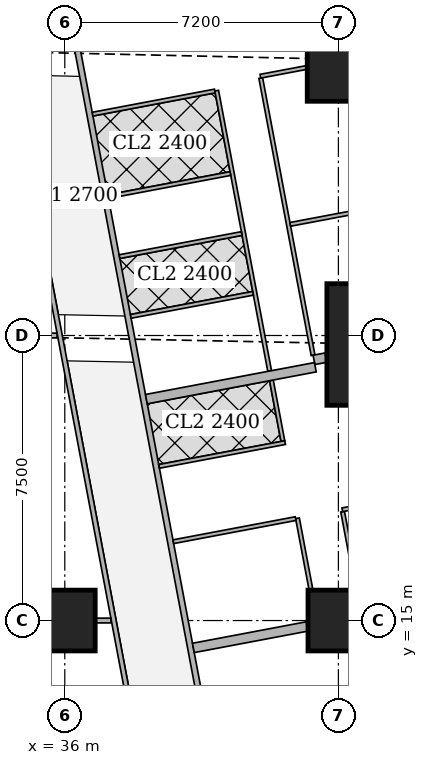
"""IFC4 building model, lengths in metres.
Left out: names, types, materials, properties, quantities, classifications, styles, units other than length and angle.
Written with IfcOpenShell. Run it as: python <this file> out.ifc"""

import sys

from ifc_helpers import new_model, si_unit, direction, frame, frame_2d, origin, origin_2d, place, context, subcontext, project, spatial, rectangle, extrude, element, fill, save


model = new_model("IFC4")
c1 = context("Model", 3, precision=1e-05, world=origin(), true_north=direction((0.0, 1.0)))
c2 = subcontext(c1, "Body", "Model", "MODEL_VIEW")
j1 = project(units=[si_unit("LENGTHUNIT", "METRE"), si_unit("PLANEANGLEUNIT", "RADIAN")], contexts=[c1])
p1 = place(None, origin())
s1 = spatial("IfcSite", under=j1, at=p1, CompositionType="ELEMENT")
p2 = place(p1, origin())
s2 = spatial("IfcBuilding", under=s1, at=p2, CompositionType="ELEMENT")
p3 = place(p2, frame((0.0, 0.0, 100.4)))
s3 = spatial("IfcBuildingStorey", under=s2, at=p3, CompositionType="ELEMENT", Elevation=100.4)
for number, where, z_axis, x_axis in (
    (1, (36.0, 15.0, 0.0), (0.0, 0.0, 1.0), (1.0, 0.0, 0.0)),
    (2, (43.2, 15.0, 0.0), (0.0, 0.0, 1.0), (1.0, 0.0, 0.0)),
):
    element("IfcColumn", number, at=place(p3, frame(where, z_axis=z_axis, x_axis=x_axis)), inside=s3, PredefinedType="COLUMN", context=c2, shape_type="SweptSolid", body=[
        extrude(rectangle(XDim=1.6, YDim=1.6, at=origin_2d()), origin(), (0.0, 0.0, 1.0), 3.75),
    ])
p4 = place(p3, frame((44.697, 22.263, 0.0), z_axis=(0.0, 0.0, 1.0), x_axis=(1.0, 0.0, 0.0)))
e3 = element("IfcColumn", 3, at=p4, inside=s3, PredefinedType="COLUMN", context=c2, shape_type="SweptSolid", body=[
    extrude(rectangle(XDim=3.6, YDim=3.2, at=origin_2d()), origin(), (0.0, 0.0, 1.0), 3.75),
])
p5 = place(p3, frame((43.48, 29.763, 0.0), z_axis=(0.0, 0.0, 1.0), x_axis=(1.0, 0.0, 0.0)))
e4 = element("IfcColumn", 4, at=p5, inside=s3, PredefinedType="COLUMN", context=c2, shape_type="SweptSolid", body=[
    extrude(rectangle(XDim=2.2, YDim=2.2, at=origin_2d()), origin(), (0.0, 0.0, 1.0), 3.75),
])
p6 = place(p3, frame((50.653, 2.703, 0.0), z_axis=(0.0, 0.0, 1.0), x_axis=(-0.185612026696, 0.982623109613, 0.0)))
e5 = element("IfcWall", 5, at=p6, inside=s3, PredefinedType="SOLIDWALL", context=c2, shape_type="SweptSolid", body=[
    extrude(rectangle(XDim=41.393, YDim=0.2, at=frame_2d((20.697, 0.0))), origin(), (0.0, 0.0, 1.0), 3.5),
])
p7 = place(p6, frame((1.633, 0.0, 0.9)))
e6 = element("IfcOpeningElement", 6, at=p7, cuts=e5, PredefinedType="OPENING", context=c2, shape_type="SweptSolid", body=[
    extrude(rectangle(XDim=1.8, YDim=1.5, at=frame_2d((0.9, 0.75))), frame((0.0, 0.11, 0.0), z_axis=(0.0, -1.0, 0.0), x_axis=(1.0, 0.0, 0.0)), (0.0, 0.0, 1.0), 0.22),
])
p8 = place(p6, frame((6.032, 0.0, 0.9)))
e7 = element("IfcOpeningElement", 7, at=p8, cuts=e5, PredefinedType="OPENING", context=c2, shape_type="SweptSolid", body=[
    extrude(rectangle(XDim=1.8, YDim=1.5, at=frame_2d((0.9, 0.75))), frame((0.0, 0.11, 0.0), z_axis=(0.0, -1.0, 0.0), x_axis=(1.0, 0.0, 0.0)), (0.0, 0.0, 1.0), 0.22),
])
p9 = place(p6, frame((9.848, 0.0, 0.9)))
e8 = element("IfcOpeningElement", 8, at=p9, cuts=e5, PredefinedType="OPENING", context=c2, shape_type="SweptSolid", body=[
    extrude(rectangle(XDim=1.8, YDim=1.5, at=frame_2d((0.9, 0.75))), frame((0.0, 0.11, 0.0), z_axis=(0.0, -1.0, 0.0), x_axis=(1.0, 0.0, 0.0)), (0.0, 0.0, 1.0), 0.22),
])
p10 = place(p6, frame((13.664, 0.0, 0.9)))
e9 = element("IfcOpeningElement", 9, at=p10, cuts=e5, PredefinedType="OPENING", context=c2, shape_type="SweptSolid", body=[
    extrude(rectangle(XDim=1.8, YDim=1.5, at=frame_2d((0.9, 0.75))), frame((0.0, 0.11, 0.0), z_axis=(0.0, -1.0, 0.0), x_axis=(1.0, 0.0, 0.0)), (0.0, 0.0, 1.0), 0.22),
])
p11 = place(p6, frame((17.481, 0.0, 0.9)))
e10 = element("IfcOpeningElement", 10, at=p11, cuts=e5, PredefinedType="OPENING", context=c2, shape_type="SweptSolid", body=[
    extrude(rectangle(XDim=1.8, YDim=1.5, at=frame_2d((0.9, 0.75))), frame((0.0, 0.11, 0.0), z_axis=(0.0, -1.0, 0.0), x_axis=(1.0, 0.0, 0.0)), (0.0, 0.0, 1.0), 0.22),
])
p12 = place(p6, frame((21.297, 0.0, 0.9)))
e11 = element("IfcOpeningElement", 11, at=p12, cuts=e5, PredefinedType="OPENING", context=c2, shape_type="SweptSolid", body=[
    extrude(rectangle(XDim=1.8, YDim=1.5, at=frame_2d((0.9, 0.75))), frame((0.0, 0.11, 0.0), z_axis=(0.0, -1.0, 0.0), x_axis=(1.0, 0.0, 0.0)), (0.0, 0.0, 1.0), 0.22),
])
p13 = place(p6, frame((25.113, 0.0, 0.9)))
e12 = element("IfcOpeningElement", 12, at=p13, cuts=e5, PredefinedType="OPENING", context=c2, shape_type="SweptSolid", body=[
    extrude(rectangle(XDim=1.8, YDim=1.5, at=frame_2d((0.9, 0.75))), frame((0.0, 0.11, 0.0), z_axis=(0.0, -1.0, 0.0), x_axis=(1.0, 0.0, 0.0)), (0.0, 0.0, 1.0), 0.22),
])
p14 = place(p6, frame((28.93, 0.0, 0.9)))
e13 = element("IfcOpeningElement", 13, at=p14, cuts=e5, PredefinedType="OPENING", context=c2, shape_type="SweptSolid", body=[
    extrude(rectangle(XDim=1.8, YDim=1.5, at=frame_2d((0.9, 0.75))), frame((0.0, 0.11, 0.0), z_axis=(0.0, -1.0, 0.0), x_axis=(1.0, 0.0, 0.0)), (0.0, 0.0, 1.0), 0.22),
])
p15 = place(p6, frame((32.746, 0.0, 0.9)))
e14 = element("IfcOpeningElement", 14, at=p15, cuts=e5, PredefinedType="OPENING", context=c2, shape_type="SweptSolid", body=[
    extrude(rectangle(XDim=1.8, YDim=1.5, at=frame_2d((0.9, 0.75))), frame((0.0, 0.11, 0.0), z_axis=(0.0, -1.0, 0.0), x_axis=(1.0, 0.0, 0.0)), (0.0, 0.0, 1.0), 0.22),
])
p16 = place(p6, frame((36.481, 0.0, 0.9)))
e15 = element("IfcOpeningElement", 15, at=p16, cuts=e5, PredefinedType="OPENING", context=c2, shape_type="SweptSolid", body=[
    extrude(rectangle(XDim=1.8, YDim=1.5, at=frame_2d((0.9, 0.75))), frame((0.0, 0.11, 0.0), z_axis=(0.0, -1.0, 0.0), x_axis=(1.0, 0.0, 0.0)), (0.0, 0.0, 1.0), 0.22),
])
p17 = place(p3, frame((33.382, 45.65, 0.0), z_axis=(0.0, 0.0, 1.0), x_axis=(0.185593544777, -0.982626600565, 0.0)))
e16 = element("IfcWall", 16, at=p17, inside=s3, PredefinedType="SOLIDWALL", context=c2, shape_type="SweptSolid", body=[
    extrude(rectangle(XDim=47.118, YDim=0.15, at=frame_2d((23.559, 0.0))), origin(), (0.0, 0.0, 1.0), 2.2),
])
p18 = place(p17, frame((10.662, 0.0, 0.0)))
e17 = element("IfcOpeningElement", 17, at=p18, cuts=e16, PredefinedType="OPENING", context=c2, shape_type="SweptSolid", body=[
    extrude(rectangle(XDim=1.0, YDim=2.1, at=frame_2d((0.5, 1.05))), frame((0.0, 0.085, 0.0), z_axis=(0.0, -1.0, 0.0), x_axis=(1.0, 0.0, 0.0)), (0.0, 0.0, 1.0), 0.17),
])
p19 = place(p17, frame((15.237, 0.0, 0.0)))
e18 = element("IfcOpeningElement", 18, at=p19, cuts=e16, PredefinedType="OPENING", context=c2, shape_type="SweptSolid", body=[
    extrude(rectangle(XDim=1.0, YDim=2.1, at=frame_2d((0.5, 1.05))), frame((0.0, 0.085, 0.0), z_axis=(0.0, -1.0, 0.0), x_axis=(1.0, 0.0, 0.0)), (0.0, 0.0, 1.0), 0.17),
])
p20 = place(p17, frame((27.341, 0.0, 0.0)))
e19 = element("IfcOpeningElement", 19, at=p20, cuts=e16, PredefinedType="OPENING", context=c2, shape_type="SweptSolid", body=[
    extrude(rectangle(XDim=1.0, YDim=2.1, at=frame_2d((0.5, 1.05))), frame((0.0, 0.085, 0.0), z_axis=(0.0, -1.0, 0.0), x_axis=(1.0, 0.0, 0.0)), (0.0, 0.0, 1.0), 0.17),
])
p21 = place(p17, frame((33.833, 0.0, 0.0)))
e20 = element("IfcOpeningElement", 20, at=p21, cuts=e16, PredefinedType="OPENING", context=c2, shape_type="SweptSolid", body=[
    extrude(rectangle(XDim=1.0, YDim=2.1, at=frame_2d((0.5, 1.05))), frame((0.0, 0.085, 0.0), z_axis=(0.0, -1.0, 0.0), x_axis=(1.0, 0.0, 0.0)), (0.0, 0.0, 1.0), 0.17),
])
p22 = place(p3, frame((41.157, 29.273, 0.0), z_axis=(0.0, 0.0, 1.0), x_axis=(0.18542464283, -0.982658486877, 0.0)))
e21 = element("IfcWall", 21, at=p22, inside=s3, PredefinedType="PARTITIONING", context=c2, shape_type="SweptSolid", body=[
    extrude(rectangle(XDim=7.421, YDim=0.1, at=frame_2d((3.71, 0.0))), origin(), (0.0, 0.0, 1.0), 2.5),
])
p23 = place(p22, frame((0.9, 0.0, 0.0)))
e22 = element("IfcOpeningElement", 22, at=p23, cuts=e21, PredefinedType="OPENING", context=c2, shape_type="SweptSolid", body=[
    extrude(rectangle(XDim=0.9, YDim=2.1, at=frame_2d((0.45, 1.05))), frame((0.0, 0.06, 0.0), z_axis=(0.0, -1.0, 0.0), x_axis=(1.0, 0.0, 0.0)), (0.0, 0.0, 1.0), 0.12),
])
p24 = place(p22, frame((4.126, 0.0, 0.0)))
e23 = element("IfcOpeningElement", 23, at=p24, cuts=e21, PredefinedType="OPENING", context=c2, shape_type="SweptSolid", body=[
    extrude(rectangle(XDim=0.9, YDim=2.1, at=frame_2d((0.45, 1.05))), frame((0.0, 0.06, 0.0), z_axis=(0.0, -1.0, 0.0), x_axis=(1.0, 0.0, 0.0)), (0.0, 0.0, 1.0), 0.12),
])
p25 = place(p3, frame((39.997, 28.942, 0.0), z_axis=(0.0, 0.0, 1.0), x_axis=(0.185686318797, -0.982609073341, 0.0)))
e24 = element("IfcWall", 24, at=p25, inside=s3, PredefinedType="PARTITIONING", context=c2, shape_type="SweptSolid", body=[
    extrude(rectangle(XDim=7.508, YDim=0.1, at=frame_2d((3.754, 0.0))), origin(), (0.0, 0.0, 1.0), 2.5),
])
p26 = place(p25, frame((0.655, 0.0, 0.0)))
e25 = element("IfcOpeningElement", 25, at=p26, cuts=e24, PredefinedType="OPENING", context=c2, shape_type="SweptSolid", body=[
    extrude(rectangle(XDim=0.9, YDim=2.1, at=frame_2d((0.45, 1.05))), frame((0.0, 0.06, 0.0), z_axis=(0.0, -1.0, 0.0), x_axis=(1.0, 0.0, 0.0)), (0.0, 0.0, 1.0), 0.12),
])
p27 = place(p25, frame((4.166, 0.0, 0.0)))
e26 = element("IfcOpeningElement", 26, at=p27, cuts=e24, PredefinedType="OPENING", context=c2, shape_type="SweptSolid", body=[
    extrude(rectangle(XDim=0.9, YDim=2.1, at=frame_2d((0.45, 1.05))), frame((0.0, 0.06, 0.0), z_axis=(0.0, -1.0, 0.0), x_axis=(1.0, 0.0, 0.0)), (0.0, 0.0, 1.0), 0.12),
])
p28 = place(p25, frame((2.563, 0.0, 0.0)))
e27 = element("IfcOpeningElement", 27, at=p28, cuts=e24, PredefinedType="OPENING", context=c2, shape_type="SweptSolid", body=[
    extrude(rectangle(XDim=0.9, YDim=2.1, at=frame_2d((0.45, 1.05))), frame((0.0, 0.06, 0.0), z_axis=(0.0, -1.0, 0.0), x_axis=(1.0, 0.0, 0.0)), (0.0, 0.0, 1.0), 0.12),
])
p29 = place(p25, frame((6.074, 0.0, 0.0)))
e28 = element("IfcOpeningElement", 28, at=p29, cuts=e24, PredefinedType="OPENING", context=c2, shape_type="SweptSolid", body=[
    extrude(rectangle(XDim=0.9, YDim=2.1, at=frame_2d((0.45, 1.05))), frame((0.0, 0.06, 0.0), z_axis=(0.0, -1.0, 0.0), x_axis=(1.0, 0.0, 0.0)), (0.0, 0.0, 1.0), 0.12),
])
p30 = place(p3, frame((42.37, 29.553, 0.0), z_axis=(0.0, 0.0, 1.0), x_axis=(-0.98263602344, -0.185543648338, 0.0)))
e29 = element("IfcWall", 29, at=p30, inside=s3, PredefinedType="PARTITIONING", context=c2, shape_type="SweptSolid", body=[
    extrude(rectangle(XDim=1.245, YDim=0.1, at=frame_2d((0.623, 0.0))), origin(), (0.0, 0.0, 1.0), 2.5),
])
p31 = place(p3, frame((46.11, 26.213, 0.0), z_axis=(0.0, 0.0, 1.0), x_axis=(-0.982623519589, -0.185609856287, 0.0)))
e30 = element("IfcWall", 30, at=p31, inside=s3, PredefinedType="PARTITIONING", context=c2, shape_type="SweptSolid", body=[
    extrude(rectangle(XDim=4.25, YDim=0.1, at=frame_2d((2.125, 0.0))), origin(), (0.0, 0.0, 1.0), 2.2),
])
p32 = place(p3, frame((39.948, 28.933, 0.0), z_axis=(0.0, 0.0, 1.0), x_axis=(-0.982542259571, -0.186039533857, 0.0)))
e31 = element("IfcWall", 31, at=p32, inside=s3, PredefinedType="PARTITIONING", context=c2, shape_type="SweptSolid", body=[
    extrude(rectangle(XDim=3.274, YDim=0.1, at=frame_2d((1.637, 0.0))), origin(), (0.0, 0.0, 1.0), 3.5),
])
p33 = place(p3, frame((40.656, 25.183, 0.0), z_axis=(0.0, 0.0, 1.0), x_axis=(-0.982596739811, -0.18575157311, 0.0)))
e32 = element("IfcWall", 32, at=p33, inside=s3, PredefinedType="PARTITIONING", context=c2, shape_type="SweptSolid", body=[
    extrude(rectangle(XDim=3.274, YDim=0.1, at=frame_2d((1.637, 0.0))), origin(), (0.0, 0.0, 1.0), 3.5),
])
p34 = place(p3, frame((40.358, 26.761, 0.0), z_axis=(0.0, 0.0, 1.0), x_axis=(-0.982607776398, -0.185693181787, 0.0)))
e33 = element("IfcWall", 33, at=p34, inside=s3, PredefinedType="PARTITIONING", context=c2, shape_type="SweptSolid", body=[
    extrude(rectangle(XDim=3.274, YDim=0.1, at=frame_2d((1.637, 0.0))), origin(), (0.0, 0.0, 1.0), 3.5),
])
p35 = place(p3, frame((40.954, 23.61, 0.0), z_axis=(0.0, 0.0, 1.0), x_axis=(-0.982661397469, -0.185409217473, 0.0)))
e34 = element("IfcWall", 34, at=p35, inside=s3, PredefinedType="PARTITIONING", context=c2, shape_type="SweptSolid", body=[
    extrude(rectangle(XDim=3.275, YDim=0.1, at=frame_2d((1.637, 0.0))), origin(), (0.0, 0.0, 1.0), 2.5),
])
p36 = place(p3, frame((41.437, 21.319, 0.0), z_axis=(0.0, 0.0, 1.0), x_axis=(0.185793689589, -0.982588777113, 0.0)))
e35 = element("IfcWall", 35, at=p36, inside=s3, PredefinedType="PARTITIONING", context=c2, shape_type="SweptSolid", body=[
    extrude(rectangle(XDim=1.625, YDim=0.1, at=frame_2d((0.813, 0.0))), origin(), (0.0, 0.0, 1.0), 3.5),
])
p37 = place(p36, frame((0.325, 0.0, 0.0)))
e36 = element("IfcOpeningElement", 36, at=p37, cuts=e35, PredefinedType="OPENING", context=c2, shape_type="SweptSolid", body=[
    extrude(rectangle(XDim=0.9, YDim=2.1, at=frame_2d((0.45, 1.05))), frame((0.0, 0.06, 0.0), z_axis=(0.0, -1.0, 0.0), x_axis=(1.0, 0.0, 0.0)), (0.0, 0.0, 1.0), 0.12),
])
p38 = place(p3, frame((41.798, 19.682, 0.0), z_axis=(0.0, 0.0, 1.0), x_axis=(-0.982656183703, -0.185436848091, 0.0)))
e37 = element("IfcWall", 37, at=p38, inside=s3, PredefinedType="PARTITIONING", context=c2, shape_type="SweptSolid", body=[
    extrude(rectangle(XDim=3.376, YDim=0.1, at=frame_2d((1.688, 0.0))), origin(), (0.0, 0.0, 1.0), 3.5),
])
p39 = place(p3, frame((43.311, 17.865, 0.0), z_axis=(0.0, 0.0, 1.0), x_axis=(0.185507827929, -0.982642786457, 0.0)))
e38 = element("IfcWall", 38, at=p39, inside=s3, PredefinedType="PARTITIONING", context=c2, shape_type="SweptSolid", body=[
    extrude(rectangle(XDim=2.091, YDim=0.1, at=frame_2d((1.046, 0.0))), origin(), (0.0, 0.0, 1.0), 3.5),
])
p40 = place(p39, frame((0.15, 0.0, 0.0)))
e39 = element("IfcOpeningElement", 39, at=p40, cuts=e38, PredefinedType="OPENING", context=c2, shape_type="SweptSolid", body=[
    extrude(rectangle(XDim=0.9, YDim=2.1, at=frame_2d((0.45, 1.05))), frame((0.0, 0.06, 0.0), z_axis=(0.0, -1.0, 0.0), x_axis=(1.0, 0.0, 0.0)), (0.0, 0.0, 1.0), 0.12),
])
p41 = place(p3, frame((42.123, 17.691, 0.0), z_axis=(0.0, 0.0, 1.0), x_axis=(0.185458984533, -0.982652006081, 0.0)))
e40 = element("IfcWall", 40, at=p41, inside=s3, PredefinedType="PARTITIONING", context=c2, shape_type="SweptSolid", body=[
    extrude(rectangle(XDim=1.914, YDim=0.1, at=frame_2d((0.957, 0.0))), origin(), (0.0, 0.0, 1.0), 3.5),
])
p42 = place(p3, frame((47.527, 18.712, 0.0), z_axis=(0.0, 0.0, 1.0), x_axis=(-0.982633535512, -0.185556823879, 0.0)))
e41 = element("IfcWall", 41, at=p42, inside=s3, PredefinedType="PARTITIONING", context=c2, shape_type="SweptSolid", body=[
    extrude(rectangle(XDim=4.3, YDim=0.1, at=frame_2d((2.15, 0.0))), origin(), (0.0, 0.0, 1.0), 2.2),
])
p43 = place(p3, frame((42.074, 17.682, 0.0), z_axis=(0.0, 0.0, 1.0), x_axis=(-0.982620626894, -0.185625169636, 0.0)))
e42 = element("IfcWall", 42, at=p43, inside=s3, PredefinedType="PARTITIONING", context=c2, shape_type="SweptSolid", body=[
    extrude(rectangle(XDim=3.275, YDim=0.1, at=frame_2d((1.637, 0.0))), origin(), (0.0, 0.0, 1.0), 3.5),
])
p44 = place(p43, frame((1.201, 0.0, 0.0)))
e43 = element("IfcOpeningElement", 43, at=p44, cuts=e42, PredefinedType="OPENING", context=c2, shape_type="SweptSolid", body=[
    extrude(rectangle(XDim=0.9, YDim=2.1, at=frame_2d((0.45, 1.05))), frame((0.0, 0.06, 0.0), z_axis=(0.0, -1.0, 0.0), x_axis=(1.0, 0.0, 0.0)), (0.0, 0.0, 1.0), 0.12),
])
p45 = place(p3, frame((42.873, 21.918, 0.0), z_axis=(0.0, 0.0, 1.0), x_axis=(-0.982431406936, -0.186624035603, 0.0)))
e44 = element("IfcWall", 44, at=p45, inside=s3, PredefinedType="SOLIDWALL", context=c2, shape_type="SweptSolid", body=[
    extrude(rectangle(XDim=0.322, YDim=0.25, at=frame_2d((0.161, 0.0))), origin(), (0.0, 0.0, 1.0), 2.5),
])
p46 = place(p3, frame((42.593, 21.665, 0.0), z_axis=(0.0, 0.0, 1.0), x_axis=(-0.982612837616, -0.185666398014, 0.0)))
e45 = element("IfcWall", 45, at=p46, inside=s3, PredefinedType="SOLIDWALL", context=c2, shape_type="SweptSolid", body=[
    extrude(rectangle(XDim=4.525, YDim=0.25, at=frame_2d((2.262, 0.0))), origin(), (0.0, 0.0, 1.0), 2.5),
])
p47 = place(p3, frame((42.376, 14.844, 0.0), z_axis=(0.0, 0.0, 1.0), x_axis=(-0.982636286056, -0.185542257522, 0.0)))
e46 = element("IfcWall", 46, at=p47, inside=s3, PredefinedType="SOLIDWALL", context=c2, shape_type="SweptSolid", body=[
    extrude(rectangle(XDim=3.045, YDim=0.25, at=frame_2d((1.522, 0.0))), origin(), (0.0, 0.0, 1.0), 3.5),
])
p48 = place(p3, frame((38.202, 10.163, 0.0), z_axis=(0.0, 0.0, 1.0), x_axis=(-0.185610321132, 0.982623431783, 0.0)))
e47 = element("IfcWall", 47, at=p48, inside=s3, PredefinedType="PARTITIONING", context=c2, shape_type="SweptSolid", body=[
    extrude(rectangle(XDim=25.111, YDim=0.125, at=frame_2d((12.556, 0.0))), origin(), (0.0, 0.0, 1.0), 2.5),
])
p49 = place(p48, frame((0.708, 0.0, 0.0)))
e48 = element("IfcOpeningElement", 48, at=p49, cuts=e47, PredefinedType="OPENING", context=c2, shape_type="SweptSolid", body=[
    extrude(rectangle(XDim=1.0, YDim=2.1, at=frame_2d((0.5, 1.05))), frame((0.0, 0.073, 0.0), z_axis=(0.0, -1.0, 0.0), x_axis=(1.0, 0.0, 0.0)), (0.0, 0.0, 1.0), 0.145),
])
p50 = place(p48, frame((6.0, 0.0, 0.0)))
e49 = element("IfcOpeningElement", 49, at=p50, cuts=e47, PredefinedType="OPENING", context=c2, shape_type="SweptSolid", body=[
    extrude(rectangle(XDim=1.0, YDim=2.1, at=frame_2d((0.5, 1.05))), frame((0.0, 0.073, 0.0), z_axis=(0.0, -1.0, 0.0), x_axis=(1.0, 0.0, 0.0)), (0.0, 0.0, 1.0), 0.145),
])
p51 = place(p48, frame((13.378, 0.0, 0.0)))
e50 = element("IfcOpeningElement", 50, at=p51, cuts=e47, PredefinedType="OPENING", context=c2, shape_type="SweptSolid", body=[
    extrude(rectangle(XDim=1.0, YDim=2.1, at=frame_2d((0.5, 1.05))), frame((0.0, 0.073, 0.0), z_axis=(0.0, -1.0, 0.0), x_axis=(1.0, 0.0, 0.0)), (0.0, 0.0, 1.0), 0.145),
])
p52 = place(p48, frame((21.25, 0.0, 0.0)))
e51 = element("IfcOpeningElement", 51, at=p52, cuts=e47, PredefinedType="OPENING", context=c2, shape_type="SweptSolid", body=[
    extrude(rectangle(XDim=1.0, YDim=2.1, at=frame_2d((0.5, 1.05))), frame((0.0, 0.073, 0.0), z_axis=(0.0, -1.0, 0.0), x_axis=(1.0, 0.0, 0.0)), (0.0, 0.0, 1.0), 0.145),
])
p53 = place(p3, frame((36.801, 15.0, 0.0), z_axis=(0.0, 0.0, 1.0), x_axis=(1.0, 0.0, 0.0)))
e52 = element("IfcWall", 52, at=p53, inside=s3, PredefinedType="PARTITIONING", context=c2, shape_type="SweptSolid", body=[
    extrude(rectangle(XDim=0.412, YDim=0.125, at=frame_2d((0.206, 0.0))), origin(), (0.0, 0.0, 1.0), 3.5),
])
p54 = place(p3, frame((33.801, 22.5, 0.0), z_axis=(0.0, 0.0, 1.0), x_axis=(1.0, 0.0, 0.0)))
e53 = element("IfcWall", 53, at=p54, inside=s3, PredefinedType="PARTITIONING", context=c2, shape_type="SweptSolid", body=[
    extrude(rectangle(XDim=1.995, YDim=0.125, at=frame_2d((0.998, 0.0))), origin(), (0.0, 0.0, 1.0), 2.5),
])
p55 = place(p23, origin())
e54 = element("IfcDoor", 54, at=p55, inside=s3, OperationType="SINGLE_SWING_LEFT", PredefinedType="DOOR", context=c2, shape_type="SweptSolid", body=[
    extrude(rectangle(XDim=0.9, YDim=2.1, at=frame_2d((0.45, 1.05))), frame((0.0, 0.025, 0.0), z_axis=(0.0, -1.0, 0.0), x_axis=(1.0, 0.0, 0.0)), (0.0, 0.0, 1.0), 0.05),
])
fill(e22, e54)
p56 = place(p24, origin())
e55 = element("IfcDoor", 55, at=p56, inside=s3, OperationType="SINGLE_SWING_LEFT", PredefinedType="DOOR", context=c2, shape_type="SweptSolid", body=[
    extrude(rectangle(XDim=0.9, YDim=2.1, at=frame_2d((0.45, 1.05))), frame((0.0, 0.025, 0.0), z_axis=(0.0, -1.0, 0.0), x_axis=(1.0, 0.0, 0.0)), (0.0, 0.0, 1.0), 0.05),
])
fill(e23, e55)
p57 = place(p26, origin())
e56 = element("IfcDoor", 56, at=p57, inside=s3, OperationType="SINGLE_SWING_RIGHT", PredefinedType="DOOR", context=c2, shape_type="SweptSolid", body=[
    extrude(rectangle(XDim=0.9, YDim=2.1, at=frame_2d((0.45, 1.05))), frame((0.0, 0.025, 0.0), z_axis=(0.0, -1.0, 0.0), x_axis=(1.0, 0.0, 0.0)), (0.0, 0.0, 1.0), 0.05),
])
fill(e25, e56)
p58 = place(p27, origin())
e57 = element("IfcDoor", 57, at=p58, inside=s3, OperationType="SINGLE_SWING_RIGHT", PredefinedType="DOOR", context=c2, shape_type="SweptSolid", body=[
    extrude(rectangle(XDim=0.9, YDim=2.1, at=frame_2d((0.45, 1.05))), frame((0.0, 0.025, 0.0), z_axis=(0.0, -1.0, 0.0), x_axis=(1.0, 0.0, 0.0)), (0.0, 0.0, 1.0), 0.05),
])
fill(e26, e57)
p59 = place(p28, origin())
e58 = element("IfcDoor", 58, at=p59, inside=s3, OperationType="SINGLE_SWING_RIGHT", PredefinedType="DOOR", context=c2, shape_type="SweptSolid", body=[
    extrude(rectangle(XDim=0.9, YDim=2.1, at=frame_2d((0.45, 1.05))), frame((0.0, 0.025, 0.0), z_axis=(0.0, -1.0, 0.0), x_axis=(1.0, 0.0, 0.0)), (0.0, 0.0, 1.0), 0.05),
])
fill(e27, e58)
p60 = place(p29, origin())
e59 = element("IfcDoor", 59, at=p60, inside=s3, OperationType="SINGLE_SWING_LEFT", PredefinedType="DOOR", context=c2, shape_type="SweptSolid", body=[
    extrude(rectangle(XDim=0.9, YDim=2.1, at=frame_2d((0.45, 1.05))), frame((0.0, 0.025, 0.0), z_axis=(0.0, -1.0, 0.0), x_axis=(1.0, 0.0, 0.0)), (0.0, 0.0, 1.0), 0.05),
])
fill(e28, e59)
p61 = place(p19, origin())
e60 = element("IfcDoor", 60, at=p61, inside=s3, OperationType="SINGLE_SWING_LEFT", PredefinedType="DOOR", context=c2, shape_type="SweptSolid", body=[
    extrude(rectangle(XDim=1.0, YDim=2.1, at=frame_2d((0.5, 1.05))), frame((0.0, 0.025, 0.0), z_axis=(0.0, -1.0, 0.0), x_axis=(1.0, 0.0, 0.0)), (0.0, 0.0, 1.0), 0.05),
])
fill(e18, e60)
p62 = place(p37, origin())
e61 = element("IfcDoor", 61, at=p62, inside=s3, OperationType="SINGLE_SWING_RIGHT", PredefinedType="DOOR", context=c2, shape_type="SweptSolid", body=[
    extrude(rectangle(XDim=0.9, YDim=2.1, at=frame_2d((0.45, 1.05))), frame((0.0, 0.025, 0.0), z_axis=(0.0, -1.0, 0.0), x_axis=(1.0, 0.0, 0.0)), (0.0, 0.0, 1.0), 0.05),
])
fill(e36, e61)
p63 = place(p40, origin())
e62 = element("IfcDoor", 62, at=p63, inside=s3, OperationType="SINGLE_SWING_LEFT", PredefinedType="DOOR", context=c2, shape_type="SweptSolid", body=[
    extrude(rectangle(XDim=0.9, YDim=2.1, at=frame_2d((0.45, 1.05))), frame((0.0, 0.025, 0.0), z_axis=(0.0, -1.0, 0.0), x_axis=(1.0, 0.0, 0.0)), (0.0, 0.0, 1.0), 0.05),
])
fill(e39, e62)
p64 = place(p20, origin())
e63 = element("IfcDoor", 63, at=p64, inside=s3, OperationType="SINGLE_SWING_LEFT", PredefinedType="DOOR", context=c2, shape_type="SweptSolid", body=[
    extrude(rectangle(XDim=1.0, YDim=2.1, at=frame_2d((0.5, 1.05))), frame((0.0, 0.025, 0.0), z_axis=(0.0, -1.0, 0.0), x_axis=(1.0, 0.0, 0.0)), (0.0, 0.0, 1.0), 0.05),
])
fill(e19, e63)
p65 = place(p44, origin())
e64 = element("IfcDoor", 64, at=p65, inside=s3, OperationType="SINGLE_SWING_RIGHT", PredefinedType="DOOR", context=c2, shape_type="SweptSolid", body=[
    extrude(rectangle(XDim=0.9, YDim=2.1, at=frame_2d((0.45, 1.05))), frame((0.0, 0.025, 0.0), z_axis=(0.0, -1.0, 0.0), x_axis=(1.0, 0.0, 0.0)), (0.0, 0.0, 1.0), 0.05),
])
fill(e43, e64)
p66 = place(p50, origin())
e65 = element("IfcDoor", 65, at=p66, inside=s3, OperationType="SINGLE_SWING_LEFT", PredefinedType="DOOR", context=c2, shape_type="SweptSolid", body=[
    extrude(rectangle(XDim=1.0, YDim=2.1, at=frame_2d((0.5, 1.05))), frame((0.0, 0.025, 0.0), z_axis=(0.0, -1.0, 0.0), x_axis=(1.0, 0.0, 0.0)), (0.0, 0.0, 1.0), 0.05),
])
fill(e49, e65)
p67 = place(p51, origin())
e66 = element("IfcDoor", 66, at=p67, inside=s3, OperationType="SINGLE_SWING_LEFT", PredefinedType="DOOR", context=c2, shape_type="SweptSolid", body=[
    extrude(rectangle(XDim=1.0, YDim=2.1, at=frame_2d((0.5, 1.05))), frame((0.0, 0.025, 0.0), z_axis=(0.0, -1.0, 0.0), x_axis=(1.0, 0.0, 0.0)), (0.0, 0.0, 1.0), 0.05),
])
fill(e50, e66)
save(model, sys.argv[1])
